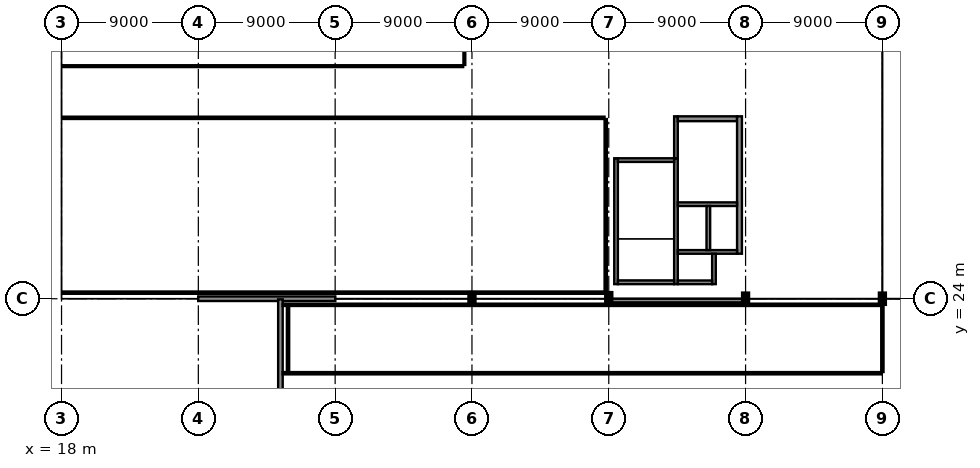
"""IFC4 building model, lengths in metres.
Left out: names, types, materials, properties, quantities, classifications, styles, units other than length and angle.
Written with IfcOpenShell. Run it as: python <this file> out.ifc"""

import sys

from ifc_helpers import new_model, si_unit, direction, frame, frame_2d, origin, origin_2d, place, context, subcontext, project, spatial, rectangle, i_section, extrude, element, fill, save


model = new_model("IFC4")
c1 = context("Model", 3, precision=1e-05, world=origin(), true_north=direction((0.0, 1.0)))
c2 = subcontext(c1, "Body", "Model", "MODEL_VIEW")
j1 = project(units=[si_unit("LENGTHUNIT", "METRE"), si_unit("PLANEANGLEUNIT", "RADIAN")], contexts=[c1])
p1 = place(None, origin())
s1 = spatial("IfcSite", under=j1, at=p1, CompositionType="ELEMENT")
p2 = place(p1, origin())
s2 = spatial("IfcBuilding", under=s1, at=p2, CompositionType="ELEMENT")
p3 = place(p2, frame((0.0, 0.0, 9.9)))
s3 = spatial("IfcBuildingStorey", under=s2, at=p3, CompositionType="ELEMENT", Elevation=9.9)
for number, where, z_axis, x_axis in (
    (1, (45.0, 24.0, 0.0), (0.0, 0.0, 1.0), (1.0, 0.0, 0.0)),
    (2, (54.0, 24.0, 0.0), (0.0, 0.0, 1.0), (0.0, 1.0, 0.0)),
):
    element("IfcColumn", number, at=place(p3, frame(where, z_axis=z_axis, x_axis=x_axis)), inside=s3, PredefinedType="COLUMN", context=c2, shape_type="SweptSolid", body=[
        extrude(i_section(OverallWidth=0.304, OverallDepth=0.716, WebThickness=0.021, FlangeThickness=0.04, at=origin_2d()), origin(), (0.0, 0.0, 1.0), 4.5),
    ])
for number, where, z_axis, x_axis in (
    (3, (63.0, 24.0, 0.0), (0.0, 0.0, 1.0), (1.0, 0.0, 0.0)),
    (4, (72.0, 24.0, 0.0), (0.0, 0.0, 1.0), (1.0, 0.0, 0.0)),
):
    element("IfcColumn", number, at=place(p3, frame(where, z_axis=z_axis, x_axis=x_axis)), inside=s3, PredefinedType="COLUMN", context=c2, shape_type="SweptSolid", body=[
        extrude(i_section(OverallWidth=0.3, OverallDepth=0.65, WebThickness=0.016, FlangeThickness=0.031, at=origin_2d()), origin(), (0.0, 0.0, 1.0), 4.5),
    ])
p4 = place(p3, frame((26.99, 24.0, 0.0), z_axis=(0.0, 0.0, 1.0), x_axis=(1.0, 0.0, 0.0)))
e5 = element("IfcWall", 5, at=p4, inside=s3, PredefinedType="SOLIDWALL", context=c2, shape_type="SweptSolid", body=[
    extrude(rectangle(XDim=9.02, YDim=0.3, at=frame_2d((4.51, 0.0))), origin(), (0.0, 0.0, 1.0), 3.147),
])
p5 = place(p3, frame((32.4, 23.96, 0.0), z_axis=(0.0, 0.0, 1.0), x_axis=(0.0, -1.0, 0.0)))
e6 = element("IfcWall", 6, at=p5, inside=s3, PredefinedType="SOLIDWALL", context=c2, shape_type="SweptSolid", body=[
    extrude(rectangle(XDim=11.97, YDim=0.3, at=frame_2d((5.985, 0.0))), origin(), (0.0, 0.0, 1.0), 3.455),
])
p6 = place(p5, frame((2.941, 0.0, 0.9)))
e7 = element("IfcOpeningElement", 7, at=p6, cuts=e6, PredefinedType="OPENING", context=c2, shape_type="SweptSolid", body=[
    extrude(rectangle(XDim=1.3, YDim=1.3, at=frame_2d((0.65, 0.65))), frame((0.0, 0.165, 0.0), z_axis=(0.0, -1.0, 0.0), x_axis=(1.0, 0.0, 0.0)), (0.0, 0.0, 1.0), 0.33),
])
p7 = place(p5, frame((8.5, 0.0, 0.9)))
e8 = element("IfcOpeningElement", 8, at=p7, cuts=e6, PredefinedType="OPENING", context=c2, shape_type="SweptSolid", body=[
    extrude(rectangle(XDim=1.3, YDim=1.3, at=frame_2d((0.65, 0.65))), frame((0.0, 0.165, 0.0), z_axis=(0.0, -1.0, 0.0), x_axis=(1.0, 0.0, 0.0)), (0.0, 0.0, 1.0), 0.33),
])
p8 = place(p3, frame((54.06, 23.88, 4.28), z_axis=(0.0, 0.0, 1.0), x_axis=(1.0, 0.0, 0.0)))
e9 = element("IfcWall", 9, at=p8, inside=s3, PredefinedType="PARAPET", context=c2, shape_type="SweptSolid", body=[
    extrude(rectangle(XDim=8.88, YDim=0.24, at=frame_2d((4.44, 0.0))), origin(), (0.0, 0.0, 1.0), 0.77),
])
p9 = place(p3, frame((54.48, 24.96, 0.0), z_axis=(0.0, 0.0, 1.0), x_axis=(0.0, 1.0, 0.0)))
e10 = element("IfcWall", 10, at=p9, inside=s3, PredefinedType="SHEAR", context=c2, shape_type="SweptSolid", body=[
    extrude(rectangle(XDim=8.28, YDim=0.24, at=frame_2d((4.14, 0.0))), origin(), (0.0, 0.0, 1.0), 4.31),
])
p10 = place(p3, frame((58.42, 24.96, 0.0), z_axis=(0.0, 0.0, 1.0), x_axis=(0.0, 1.0, 0.0)))
e11 = element("IfcWall", 11, at=p10, inside=s3, PredefinedType="SHEAR", context=c2, shape_type="SweptSolid", body=[
    extrude(rectangle(XDim=8.28, YDim=0.24, at=frame_2d((4.14, 0.0))), origin(), (0.0, 0.0, 1.0), 4.31),
])
p11 = place(p10, frame((6.49, 0.0, 0.0)))
e12 = element("IfcOpeningElement", 12, at=p11, cuts=e11, PredefinedType="OPENING", context=c2, shape_type="SweptSolid", body=[
    extrude(rectangle(XDim=1.3, YDim=2.2, at=frame_2d((0.65, 1.1))), frame((0.0, 0.135, 0.0), z_axis=(0.0, -1.0, 0.0), x_axis=(1.0, 0.0, 0.0)), (0.0, 0.0, 1.0), 0.27),
])
for number, where, z_axis, x_axis in (
    (13, (54.6, 25.08, 0.0), (0.0, 0.0, 1.0), (1.0, 0.0, 0.0)),
    (14, (54.6, 33.12, 0.0), (0.0, 0.0, 1.0), (1.0, 0.0, 0.0)),
):
    element("IfcWall", number, at=place(p3, frame(where, z_axis=z_axis, x_axis=x_axis)), inside=s3, PredefinedType="SHEAR", context=c2, shape_type="SweptSolid", body=[
        extrude(rectangle(XDim=3.7, YDim=0.24, at=frame_2d((1.85, 0.0))), origin(), (0.0, 0.0, 1.0), 4.31),
    ])
p12 = place(p3, frame((58.42, 33.24, 0.0), z_axis=(0.0, 0.0, 1.0), x_axis=(0.0, 1.0, 0.0)))
e15 = element("IfcWall", 15, at=p12, inside=s3, PredefinedType="SHEAR", context=c2, shape_type="SweptSolid", body=[
    extrude(rectangle(XDim=2.76, YDim=0.24, at=frame_2d((1.38, 0.0))), origin(), (0.0, 0.0, 1.0), 4.16),
])
p13 = place(p3, frame((58.54, 35.84, 0.0), z_axis=(0.0, 0.0, 1.0), x_axis=(1.0, 0.0, 0.0)))
e16 = element("IfcWall", 16, at=p13, inside=s3, PredefinedType="SHEAR", context=c2, shape_type="SweptSolid", body=[
    extrude(rectangle(XDim=3.9, YDim=0.32, at=frame_2d((1.95, 0.0))), origin(), (0.0, 0.0, 1.0), 4.16),
])
p14 = place(p13, frame((1.225, 0.0, 0.0)))
e17 = element("IfcOpeningElement", 17, at=p14, cuts=e16, PredefinedType="OPENING", context=c2, shape_type="SweptSolid", body=[
    extrude(rectangle(XDim=1.45, YDim=2.2, at=frame_2d((0.725, 1.1))), frame((0.0, 0.175, 0.0), z_axis=(0.0, -1.0, 0.0), x_axis=(1.0, 0.0, 0.0)), (0.0, 0.0, 1.0), 0.35),
])
p15 = place(p3, frame((62.6, 26.96, 0.0), z_axis=(0.0, 0.0, 1.0), x_axis=(0.0, 1.0, 0.0)))
e18 = element("IfcWall", 18, at=p15, inside=s3, PredefinedType="SHEAR", context=c2, shape_type="SweptSolid", body=[
    extrude(rectangle(XDim=9.04, YDim=0.32, at=frame_2d((4.52, 0.0))), origin(), (0.0, 0.0, 1.0), 4.16),
])
p16 = place(p3, frame((58.54, 30.22, 0.0), z_axis=(0.0, 0.0, 1.0), x_axis=(1.0, 0.0, 0.0)))
e19 = element("IfcWall", 19, at=p16, inside=s3, PredefinedType="SHEAR", context=c2, shape_type="SweptSolid", body=[
    extrude(rectangle(XDim=3.9, YDim=0.24, at=frame_2d((1.95, 0.0))), origin(), (0.0, 0.0, 1.0), 4.31),
])
p17 = place(p16, frame((0.385, 0.0, 0.0)))
e20 = element("IfcOpeningElement", 20, at=p17, cuts=e19, PredefinedType="OPENING", context=c2, shape_type="SweptSolid", body=[
    extrude(rectangle(XDim=1.3, YDim=2.2, at=frame_2d((0.65, 1.1))), frame((0.0, 0.135, 0.0), z_axis=(0.0, -1.0, 0.0), x_axis=(1.0, 0.0, 0.0)), (0.0, 0.0, 1.0), 0.27),
])
p18 = place(p16, frame((2.335, 0.0, 0.0)))
e21 = element("IfcOpeningElement", 21, at=p18, cuts=e19, PredefinedType="OPENING", context=c2, shape_type="SweptSolid", body=[
    extrude(rectangle(XDim=1.3, YDim=2.2, at=frame_2d((0.65, 1.1))), frame((0.0, 0.135, 0.0), z_axis=(0.0, -1.0, 0.0), x_axis=(1.0, 0.0, 0.0)), (0.0, 0.0, 1.0), 0.27),
])
p19 = place(p3, frame((58.54, 27.08, 0.0), z_axis=(0.0, 0.0, 1.0), x_axis=(1.0, 0.0, 0.0)))
e22 = element("IfcWall", 22, at=p19, inside=s3, PredefinedType="SHEAR", context=c2, shape_type="SweptSolid", body=[
    extrude(rectangle(XDim=3.9, YDim=0.24, at=frame_2d((1.95, 0.0))), origin(), (0.0, 0.0, 1.0), 4.31),
])
p20 = place(p3, frame((60.55, 27.2, 0.0), z_axis=(0.0, 0.0, 1.0), x_axis=(0.0, 1.0, 0.0)))
e23 = element("IfcWall", 23, at=p20, inside=s3, PredefinedType="SHEAR", context=c2, shape_type="SweptSolid", body=[
    extrude(rectangle(XDim=2.9, YDim=0.24, at=frame_2d((1.45, 0.0))), origin(), (0.0, 0.0, 1.0), 4.31),
])
p21 = place(p3, frame((60.92, 24.96, 0.0), z_axis=(0.0, 0.0, 1.0), x_axis=(0.0, 1.0, 0.0)))
e24 = element("IfcWall", 24, at=p21, inside=s3, PredefinedType="SHEAR", context=c2, shape_type="SweptSolid", body=[
    extrude(rectangle(XDim=2.0, YDim=0.24, at=frame_2d((1.0, 0.0))), origin(), (0.0, 0.0, 1.0), 4.31),
])
p22 = place(p3, frame((58.54, 25.08, 0.0), z_axis=(0.0, 0.0, 1.0), x_axis=(1.0, 0.0, 0.0)))
e25 = element("IfcWall", 25, at=p22, inside=s3, PredefinedType="SHEAR", context=c2, shape_type="SweptSolid", body=[
    extrude(rectangle(XDim=2.26, YDim=0.24, at=frame_2d((1.13, 0.0))), origin(), (0.0, 0.0, 1.0), 4.31),
])
p23 = place(p3, frame((18.075, 35.9, 0.0), z_axis=(0.0, 0.0, 1.0), x_axis=(1.0, 0.0, 0.0)))
e26 = element("IfcWall", 26, at=p23, inside=s3, PredefinedType="PARTITIONING", context=c2, shape_type="SweptSolid", body=[
    extrude(rectangle(XDim=35.645, YDim=0.15, at=frame_2d((17.823, 0.0))), origin(), (0.0, 0.0, 1.0), 4.14),
])
p24 = place(p23, frame((17.297, 0.0, 0.0)))
e27 = element("IfcOpeningElement", 27, at=p24, cuts=e26, PredefinedType="OPENING", context=c2, shape_type="SweptSolid", body=[
    extrude(rectangle(XDim=1.05, YDim=2.25, at=frame_2d((0.525, 1.125))), frame((0.0, 0.09, 0.0), z_axis=(0.0, -1.0, 0.0), x_axis=(1.0, 0.0, 0.0)), (0.0, 0.0, 1.0), 0.18),
])
p25 = place(p3, frame((53.8, 35.82, 0.0), z_axis=(0.0, 0.0, 1.0), x_axis=(0.0, -1.0, 0.0)))
e28 = element("IfcWall", 28, at=p25, inside=s3, PredefinedType="PARTITIONING", context=c2, shape_type="SweptSolid", body=[
    extrude(rectangle(XDim=11.34, YDim=0.15, at=frame_2d((5.67, 0.0))), origin(), (0.0, 0.0, 1.0), 3.355),
])
p26 = place(p3, frame((53.72, 24.4, 0.0), z_axis=(0.0, 0.0, 1.0), x_axis=(-1.0, 0.0, 0.0)))
e29 = element("IfcWall", 29, at=p26, inside=s3, PredefinedType="PARTITIONING", context=c2, shape_type="SweptSolid", body=[
    extrude(rectangle(XDim=35.645, YDim=0.15, at=frame_2d((17.823, 0.0))), origin(), (0.0, 0.0, 1.0), 4.14),
])
p27 = place(p3, frame((44.5, 53.925, 0.0), z_axis=(0.0, 0.0, 1.0), x_axis=(0.0, -1.0, 0.0)))
e30 = element("IfcWall", 30, at=p27, inside=s3, PredefinedType="PARTITIONING", context=c2, shape_type="SweptSolid", body=[
    extrude(rectangle(XDim=14.545, YDim=0.12, at=frame_2d((7.272, 0.0))), origin(), (0.0, 0.0, 1.0), 4.14),
])
p28 = place(p3, frame((44.42, 39.3, 0.0), z_axis=(0.0, 0.0, 1.0), x_axis=(-1.0, 0.0, 0.0)))
e31 = element("IfcWall", 31, at=p28, inside=s3, PredefinedType="PARTITIONING", context=c2, shape_type="SweptSolid", body=[
    extrude(rectangle(XDim=26.345, YDim=0.12, at=frame_2d((13.172, 0.0))), origin(), (0.0, 0.0, 1.0), 4.14),
])
p29 = place(p28, frame((12.723, 0.0, 0.0)))
e32 = element("IfcOpeningElement", 32, at=p29, cuts=e31, PredefinedType="OPENING", context=c2, shape_type="SweptSolid", body=[
    extrude(rectangle(XDim=0.9, YDim=2.1, at=frame_2d((0.45, 1.05))), frame((0.0, 0.075, 0.0), z_axis=(0.0, -1.0, 0.0), x_axis=(1.0, 0.0, 0.0)), (0.0, 0.0, 1.0), 0.15),
])
p30 = place(p3, frame((32.545, 23.6, 0.0), z_axis=(0.0, 0.0, 1.0), x_axis=(1.0, 0.0, 0.0)))
e33 = element("IfcWall", 33, at=p30, inside=s3, PredefinedType="PARTITIONING", context=c2, shape_type="SweptSolid", body=[
    extrude(rectangle(XDim=39.375, YDim=0.15, at=frame_2d((19.688, 0.0))), origin(), (0.0, 0.0, 1.0), 4.14),
])
p31 = place(p3, frame((72.0, 23.52, 0.0), z_axis=(0.0, 0.0, 1.0), x_axis=(0.0, -1.0, 0.0)))
e34 = element("IfcWall", 34, at=p31, inside=s3, PredefinedType="PARTITIONING", context=c2, shape_type="SweptSolid", body=[
    extrude(rectangle(XDim=4.34, YDim=0.15, at=frame_2d((2.17, 0.0))), origin(), (0.0, 0.0, 1.0), 3.575),
])
p32 = place(p3, frame((71.92, 19.1, 0.0), z_axis=(0.0, 0.0, 1.0), x_axis=(-1.0, 0.0, 0.0)))
e35 = element("IfcWall", 35, at=p32, inside=s3, PredefinedType="PARTITIONING", context=c2, shape_type="SweptSolid", body=[
    extrude(rectangle(XDim=39.375, YDim=0.15, at=frame_2d((19.688, 0.0))), origin(), (0.0, 0.0, 1.0), 4.14),
])
p33 = place(p32, frame((19.163, 0.0, 0.0)))
e36 = element("IfcOpeningElement", 36, at=p33, cuts=e35, PredefinedType="OPENING", context=c2, shape_type="SweptSolid", body=[
    extrude(rectangle(XDim=1.05, YDim=2.25, at=frame_2d((0.525, 1.125))), frame((0.0, 0.09, 0.0), z_axis=(0.0, -1.0, 0.0), x_axis=(1.0, 0.0, 0.0)), (0.0, 0.0, 1.0), 0.18),
])
p34 = place(p3, frame((32.9, 19.17, 0.0), z_axis=(0.0, 0.0, 1.0), x_axis=(0.0, 1.0, 0.0)))
e37 = element("IfcWall", 37, at=p34, inside=s3, PredefinedType="PARTITIONING", context=c2, shape_type="SweptSolid", body=[
    extrude(rectangle(XDim=4.36, YDim=0.15, at=frame_2d((2.18, 0.0))), origin(), (0.0, 0.0, 1.0), 4.14),
])
p35 = place(p6, origin())
e38 = element("IfcWindow", 38, at=p35, inside=s3, PartitioningType="SINGLE_PANEL", PredefinedType="WINDOW", context=c2, shape_type="SweptSolid", body=[
    extrude(rectangle(XDim=1.3, YDim=1.3, at=frame_2d((0.65, 0.65))), frame((0.0, 0.03, 0.0), z_axis=(0.0, -1.0, 0.0), x_axis=(1.0, 0.0, 0.0)), (0.0, 0.0, 1.0), 0.06),
])
fill(e7, e38)
p36 = place(p11, frame((1.3, 0.0, 0.0), z_axis=(0.0, 0.0, 1.0), x_axis=(-1.0, 0.0, 0.0)))
e39 = element("IfcDoor", 39, at=p36, inside=s3, OperationType="SINGLE_SWING_RIGHT", PredefinedType="DOOR", context=c2, shape_type="SweptSolid", body=[
    extrude(rectangle(XDim=1.3, YDim=2.2, at=frame_2d((0.65, 1.1))), frame((0.0, 0.025, 0.0), z_axis=(0.0, -1.0, 0.0), x_axis=(1.0, 0.0, 0.0)), (0.0, 0.0, 1.0), 0.05),
])
fill(e12, e39)
p37 = place(p14, origin())
e40 = element("IfcDoor", 40, at=p37, inside=s3, OperationType="DOUBLE_DOOR_SINGLE_SWING", PredefinedType="DOOR", context=c2, shape_type="SweptSolid", body=[
    extrude(rectangle(XDim=1.45, YDim=2.2, at=frame_2d((0.725, 1.1))), frame((0.0, 0.025, 0.0), z_axis=(0.0, -1.0, 0.0), x_axis=(1.0, 0.0, 0.0)), (0.0, 0.0, 1.0), 0.05),
])
fill(e17, e40)
p38 = place(p17, origin())
e41 = element("IfcDoor", 41, at=p38, inside=s3, OperationType="DOUBLE_DOOR_SLIDING", PredefinedType="DOOR", context=c2, shape_type="SweptSolid", body=[
    extrude(rectangle(XDim=1.3, YDim=2.2, at=frame_2d((0.65, 1.1))), frame((0.0, 0.025, 0.0), z_axis=(0.0, -1.0, 0.0), x_axis=(1.0, 0.0, 0.0)), (0.0, 0.0, 1.0), 0.05),
])
fill(e20, e41)
p39 = place(p18, origin())
e42 = element("IfcDoor", 42, at=p39, inside=s3, OperationType="DOUBLE_DOOR_SLIDING", PredefinedType="DOOR", context=c2, shape_type="SweptSolid", body=[
    extrude(rectangle(XDim=1.3, YDim=2.2, at=frame_2d((0.65, 1.1))), frame((0.0, 0.025, 0.0), z_axis=(0.0, -1.0, 0.0), x_axis=(1.0, 0.0, 0.0)), (0.0, 0.0, 1.0), 0.05),
])
fill(e21, e42)
p40 = place(p24, frame((1.05, 0.0, 0.0), z_axis=(0.0, 0.0, 1.0), x_axis=(-1.0, 0.0, 0.0)))
e43 = element("IfcDoor", 43, at=p40, inside=s3, OperationType="SINGLE_SWING_LEFT", PredefinedType="DOOR", context=c2, shape_type="SweptSolid", body=[
    extrude(rectangle(XDim=1.05, YDim=2.25, at=frame_2d((0.525, 1.125))), frame((0.0, 0.025, 0.0), z_axis=(0.0, -1.0, 0.0), x_axis=(1.0, 0.0, 0.0)), (0.0, 0.0, 1.0), 0.05),
])
fill(e27, e43)
p41 = place(p29, origin())
e44 = element("IfcDoor", 44, at=p41, inside=s3, OperationType="SINGLE_SWING_RIGHT", PredefinedType="DOOR", context=c2, shape_type="SweptSolid", body=[
    extrude(rectangle(XDim=0.9, YDim=2.1, at=frame_2d((0.45, 1.05))), frame((0.0, 0.025, 0.0), z_axis=(0.0, -1.0, 0.0), x_axis=(1.0, 0.0, 0.0)), (0.0, 0.0, 1.0), 0.05),
])
fill(e32, e44)
p42 = place(p33, origin())
e45 = element("IfcDoor", 45, at=p42, inside=s3, OperationType="SINGLE_SWING_LEFT", PredefinedType="DOOR", context=c2, shape_type="SweptSolid", body=[
    extrude(rectangle(XDim=1.05, YDim=2.25, at=frame_2d((0.525, 1.125))), frame((0.0, 0.025, 0.0), z_axis=(0.0, -1.0, 0.0), x_axis=(1.0, 0.0, 0.0)), (0.0, 0.0, 1.0), 0.05),
])
fill(e36, e45)
save(model, sys.argv[1])
